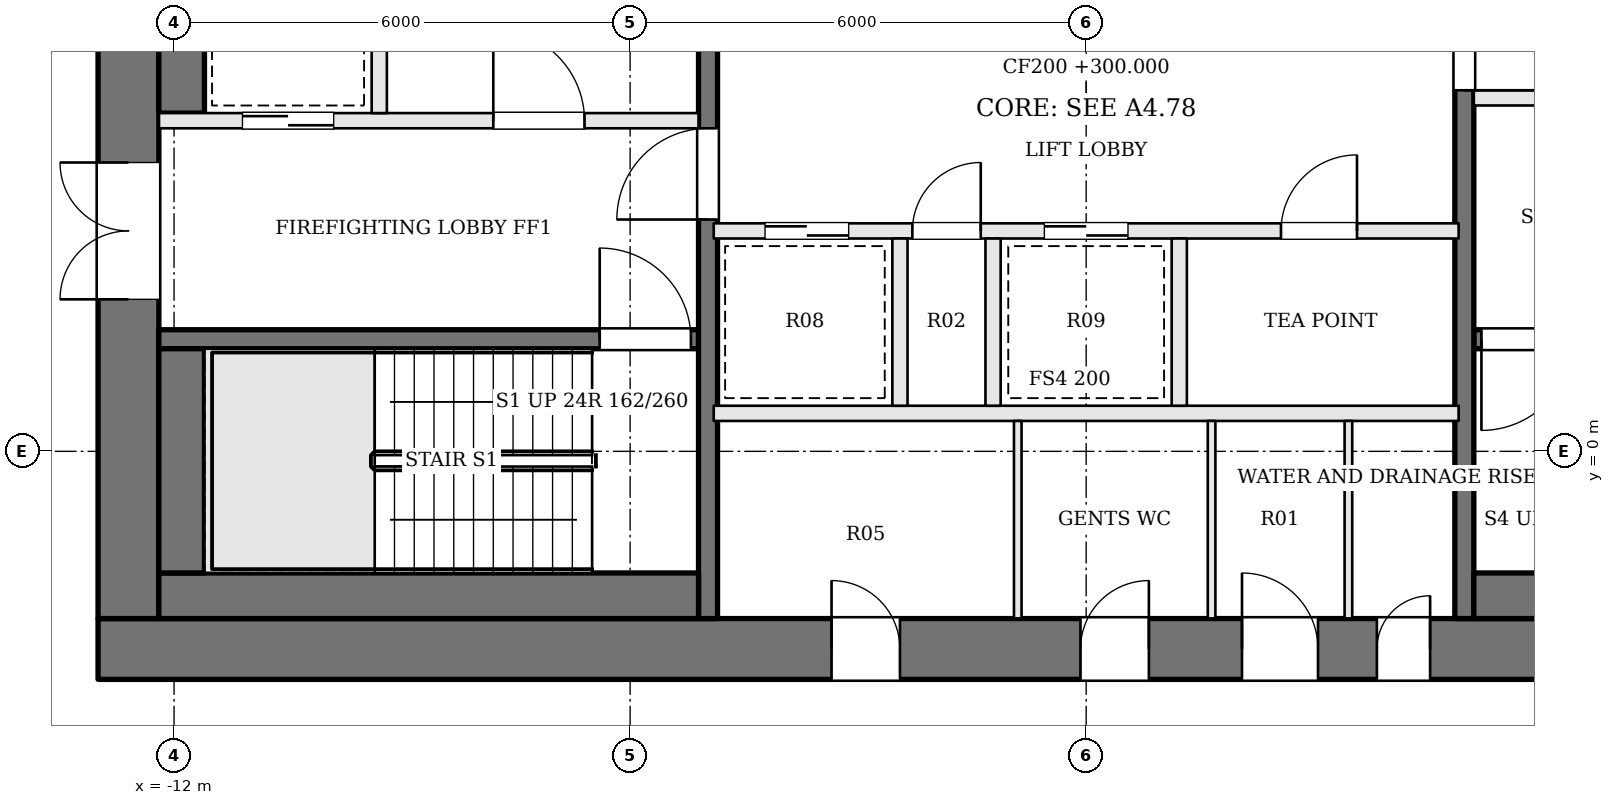
"""IFC4 building model, lengths in metres.
Left out: names, types, materials, properties, quantities, classifications, styles, units other than length and angle.
Written with IfcOpenShell. Run it as: python <this file> out.ifc"""

import sys

from ifc_helpers import new_model, si_unit, direction, frame, frame_2d, origin, place, context, subcontext, project, spatial, rectangle, extrude, element, fill, save


model = new_model("IFC4")
c1 = context("Model", 3, precision=1e-05, world=origin(), true_north=direction((0.0, 1.0)))
c2 = subcontext(c1, "Body", "Model", "MODEL_VIEW")
j1 = project(units=[si_unit("LENGTHUNIT", "METRE"), si_unit("PLANEANGLEUNIT", "RADIAN")], contexts=[c1])
p1 = place(None, origin())
s1 = spatial("IfcSite", under=j1, at=p1, CompositionType="ELEMENT")
p2 = place(p1, origin())
s2 = spatial("IfcBuilding", under=s1, at=p2, CompositionType="ELEMENT")
p3 = place(p2, frame((0.0, 0.0, 300.0)))
s3 = spatial("IfcBuildingStorey", under=s2, at=p3, CompositionType="ELEMENT", Elevation=300.0)
p4 = place(p3, frame((-13.0, -2.6, 0.0), z_axis=(0.0, 0.0, 1.0), x_axis=(1.0, 0.0, 0.0)))
e1 = element("IfcWall", 1, at=p4, inside=s3, PredefinedType="SHEAR", context=c2, shape_type="SweptSolid", body=[
    extrude(rectangle(XDim=26.0, YDim=0.8, at=frame_2d((13.0, 0.0))), origin(), (0.0, 0.0, 1.0), 3.9),
])
p5 = place(p4, frame((9.65, 0.0, 0.0)))
e2 = element("IfcOpeningElement", 2, at=p5, cuts=e1, PredefinedType="OPENING", context=c2, shape_type="SweptSolid", body=[
    extrude(rectangle(XDim=0.9, YDim=2.1, at=frame_2d((0.45, 1.05))), frame((0.0, 0.41, 0.0), z_axis=(0.0, -1.0, 0.0), x_axis=(1.0, 0.0, 0.0)), (0.0, 0.0, 1.0), 0.82),
])
p6 = place(p4, frame((12.925, 0.0, 0.0)))
e3 = element("IfcOpeningElement", 3, at=p6, cuts=e1, PredefinedType="OPENING", context=c2, shape_type="SweptSolid", body=[
    extrude(rectangle(XDim=0.9, YDim=2.1, at=frame_2d((0.45, 1.05))), frame((0.0, 0.41, 0.0), z_axis=(0.0, -1.0, 0.0), x_axis=(1.0, 0.0, 0.0)), (0.0, 0.0, 1.0), 0.82),
])
p7 = place(p4, frame((15.05, 0.0, 0.0)))
e4 = element("IfcOpeningElement", 4, at=p7, cuts=e1, PredefinedType="OPENING", context=c2, shape_type="SweptSolid", body=[
    extrude(rectangle(XDim=1.0, YDim=2.1, at=frame_2d((0.5, 1.05))), frame((0.0, 0.41, 0.0), z_axis=(0.0, -1.0, 0.0), x_axis=(1.0, 0.0, 0.0)), (0.0, 0.0, 1.0), 0.82),
])
p8 = place(p4, frame((16.825, 0.0, 0.0)))
e5 = element("IfcOpeningElement", 5, at=p8, cuts=e1, PredefinedType="OPENING", context=c2, shape_type="SweptSolid", body=[
    extrude(rectangle(XDim=0.7, YDim=2.1, at=frame_2d((0.35, 1.05))), frame((0.0, 0.41, 0.0), z_axis=(0.0, -1.0, 0.0), x_axis=(1.0, 0.0, 0.0)), (0.0, 0.0, 1.0), 0.82),
])
p9 = place(p3, frame((-12.6, -2.2, 0.0), z_axis=(0.0, 0.0, 1.0), x_axis=(0.0, 1.0, 0.0)))
e6 = element("IfcWall", 6, at=p9, inside=s3, PredefinedType="SHEAR", context=c2, shape_type="SweptSolid", body=[
    extrude(rectangle(XDim=13.4, YDim=0.8, at=frame_2d((6.7, 0.0))), origin(), (0.0, 0.0, 1.0), 3.9),
])
p10 = place(p9, frame((4.2, 0.0, 0.0)))
e7 = element("IfcOpeningElement", 7, at=p10, cuts=e6, PredefinedType="OPENING", context=c2, shape_type="SweptSolid", body=[
    extrude(rectangle(XDim=1.8, YDim=2.1, at=frame_2d((0.9, 1.05))), frame((0.0, 0.41, 0.0), z_axis=(0.0, -1.0, 0.0), x_axis=(1.0, 0.0, 0.0)), (0.0, 0.0, 1.0), 0.82),
])
p11 = place(p3, frame((-12.2, 1.475, 0.0), z_axis=(0.0, 0.0, 1.0), x_axis=(1.0, 0.0, 0.0)))
e8 = element("IfcWall", 8, at=p11, inside=s3, PredefinedType="SOLIDWALL", context=c2, shape_type="SweptSolid", body=[
    extrude(rectangle(XDim=7.1, YDim=0.25, at=frame_2d((3.55, 0.0))), origin(), (0.0, 0.0, 1.0), 3.7),
])
p12 = place(p11, frame((5.8, 0.0, 0.0)))
e9 = element("IfcOpeningElement", 9, at=p12, cuts=e8, PredefinedType="OPENING", context=c2, shape_type="SweptSolid", body=[
    extrude(rectangle(XDim=1.2, YDim=2.1, at=frame_2d((0.6, 1.05))), frame((0.0, 0.135, 0.0), z_axis=(0.0, -1.0, 0.0), x_axis=(1.0, 0.0, 0.0)), (0.0, 0.0, 1.0), 0.27),
])
p13 = place(p3, frame((-12.2, 4.35, 0.0), z_axis=(0.0, 0.0, 1.0), x_axis=(1.0, 0.0, 0.0)))
e10 = element("IfcWall", 10, at=p13, inside=s3, PredefinedType="SOLIDWALL", context=c2, shape_type="SweptSolid", body=[
    extrude(rectangle(XDim=7.1, YDim=0.2, at=frame_2d((3.55, 0.0))), origin(), (0.0, 0.0, 1.0), 3.7),
])
p14 = place(p13, frame((4.4, 0.0, 0.0)))
e11 = element("IfcOpeningElement", 11, at=p14, cuts=e10, PredefinedType="OPENING", context=c2, shape_type="SweptSolid", body=[
    extrude(rectangle(XDim=1.2, YDim=2.1, at=frame_2d((0.6, 1.05))), frame((0.0, 0.11, 0.0), z_axis=(0.0, -1.0, 0.0), x_axis=(1.0, 0.0, 0.0)), (0.0, 0.0, 1.0), 0.22),
])
p15 = place(p13, frame((1.1, 0.0, 0.0)))
e12 = element("IfcOpeningElement", 12, at=p15, cuts=e10, PredefinedType="OPENING", context=c2, shape_type="SweptSolid", body=[
    extrude(rectangle(XDim=1.2, YDim=2.1, at=frame_2d((0.6, 1.05))), frame((0.0, 0.11, 0.0), z_axis=(0.0, -1.0, 0.0), x_axis=(1.0, 0.0, 0.0)), (0.0, 0.0, 1.0), 0.22),
])
p16 = place(p3, frame((12.2, 4.65, 0.0), z_axis=(0.0, 0.0, 1.0), x_axis=(-1.0, 0.0, 0.0)))
e13 = element("IfcWall", 13, at=p16, inside=s3, PredefinedType="SOLIDWALL", context=c2, shape_type="SweptSolid", body=[
    extrude(rectangle(XDim=7.1, YDim=0.2, at=frame_2d((3.55, 0.0))), origin(), (0.0, 0.0, 1.0), 3.7),
])
p17 = place(p16, frame((4.4, 0.0, 0.0)))
e14 = element("IfcOpeningElement", 14, at=p17, cuts=e13, PredefinedType="OPENING", context=c2, shape_type="SweptSolid", body=[
    extrude(rectangle(XDim=1.2, YDim=2.1, at=frame_2d((0.6, 1.05))), frame((0.0, 0.11, 0.0), z_axis=(0.0, -1.0, 0.0), x_axis=(1.0, 0.0, 0.0)), (0.0, 0.0, 1.0), 0.22),
])
p18 = place(p16, frame((1.1, 0.0, 0.0)))
e15 = element("IfcOpeningElement", 15, at=p18, cuts=e13, PredefinedType="OPENING", context=c2, shape_type="SweptSolid", body=[
    extrude(rectangle(XDim=1.2, YDim=2.1, at=frame_2d((0.6, 1.05))), frame((0.0, 0.11, 0.0), z_axis=(0.0, -1.0, 0.0), x_axis=(1.0, 0.0, 0.0)), (0.0, 0.0, 1.0), 0.22),
])
p19 = place(p3, frame((12.2, 1.475, 0.0), z_axis=(0.0, 0.0, 1.0), x_axis=(-1.0, 0.0, 0.0)))
e16 = element("IfcWall", 16, at=p19, inside=s3, PredefinedType="SOLIDWALL", context=c2, shape_type="SweptSolid", body=[
    extrude(rectangle(XDim=7.1, YDim=0.25, at=frame_2d((3.55, 0.0))), origin(), (0.0, 0.0, 1.0), 3.7),
])
p20 = place(p19, frame((5.8, 0.0, 0.0)))
e17 = element("IfcOpeningElement", 17, at=p20, cuts=e16, PredefinedType="OPENING", context=c2, shape_type="SweptSolid", body=[
    extrude(rectangle(XDim=1.2, YDim=2.1, at=frame_2d((0.6, 1.05))), frame((0.0, 0.135, 0.0), z_axis=(0.0, -1.0, 0.0), x_axis=(1.0, 0.0, 0.0)), (0.0, 0.0, 1.0), 0.27),
])
p21 = place(p3, frame((-9.3, 4.45, 0.0), z_axis=(0.0, 0.0, 1.0), x_axis=(0.0, 1.0, 0.0)))
e18 = element("IfcWall", 18, at=p21, inside=s3, PredefinedType="SOLIDWALL", context=c2, shape_type="SweptSolid", body=[
    extrude(rectangle(XDim=3.0, YDim=0.2, at=frame_2d((1.5, 0.0))), origin(), (0.0, 0.0, 1.0), 3.7),
])
p22 = place(p3, frame((-4.975, -2.2, 0.0), z_axis=(0.0, 0.0, 1.0), x_axis=(0.0, 1.0, 0.0)))
e19 = element("IfcWall", 19, at=p22, inside=s3, PredefinedType="SOLIDWALL", context=c2, shape_type="SweptSolid", body=[
    extrude(rectangle(XDim=13.4, YDim=0.25, at=frame_2d((6.7, 0.0))), origin(), (0.0, 0.0, 1.0), 3.7),
])
p23 = place(p22, frame((5.25, 0.0, 0.0)))
e20 = element("IfcOpeningElement", 20, at=p23, cuts=e19, PredefinedType="OPENING", context=c2, shape_type="SweptSolid", body=[
    extrude(rectangle(XDim=1.2, YDim=2.1, at=frame_2d((0.6, 1.05))), frame((0.0, 0.135, 0.0), z_axis=(0.0, -1.0, 0.0), x_axis=(1.0, 0.0, 0.0)), (0.0, 0.0, 1.0), 0.27),
])
p24 = place(p3, frame((4.975, 11.2, 0.0), z_axis=(0.0, 0.0, 1.0), x_axis=(0.0, -1.0, 0.0)))
e21 = element("IfcWall", 21, at=p24, inside=s3, PredefinedType="SOLIDWALL", context=c2, shape_type="SweptSolid", body=[
    extrude(rectangle(XDim=13.4, YDim=0.25, at=frame_2d((6.7, 0.0))), origin(), (0.0, 0.0, 1.0), 3.7),
])
p25 = place(p24, frame((5.25, 0.0, 0.0)))
e22 = element("IfcOpeningElement", 22, at=p25, cuts=e21, PredefinedType="OPENING", context=c2, shape_type="SweptSolid", body=[
    extrude(rectangle(XDim=1.2, YDim=2.1, at=frame_2d((0.6, 1.05))), frame((0.0, 0.135, 0.0), z_axis=(0.0, -1.0, 0.0), x_axis=(1.0, 0.0, 0.0)), (0.0, 0.0, 1.0), 0.27),
])
p26 = place(p3, frame((-12.2, -1.9, 0.0), z_axis=(0.0, 0.0, 1.0), x_axis=(1.0, 0.0, 0.0)))
e23 = element("IfcWall", 23, at=p26, inside=s3, PredefinedType="SOLIDWALL", context=c2, shape_type="SweptSolid", body=[
    extrude(rectangle(XDim=7.1, YDim=0.6, at=frame_2d((3.55, 0.0))), origin(), (0.0, 0.0, 1.0), 3.7),
])
p27 = place(p3, frame((-11.9, -1.6, 0.0), z_axis=(0.0, 0.0, 1.0), x_axis=(0.0, 1.0, 0.0)))
e24 = element("IfcWall", 24, at=p27, inside=s3, PredefinedType="SOLIDWALL", context=c2, shape_type="SweptSolid", body=[
    extrude(rectangle(XDim=2.95, YDim=0.6, at=frame_2d((1.475, 0.0))), origin(), (0.0, 0.0, 1.0), 3.7),
])
p28 = place(p3, frame((-11.9, 4.45, 0.0), z_axis=(0.0, 0.0, 1.0), x_axis=(0.0, 1.0, 0.0)))
e25 = element("IfcWall", 25, at=p28, inside=s3, PredefinedType="SOLIDWALL", context=c2, shape_type="SweptSolid", body=[
    extrude(rectangle(XDim=3.0, YDim=0.6, at=frame_2d((1.5, 0.0))), origin(), (0.0, 0.0, 1.0), 3.7),
])
p29 = place(p3, frame((12.2, -1.9, 0.0), z_axis=(0.0, 0.0, 1.0), x_axis=(-1.0, 0.0, 0.0)))
e26 = element("IfcWall", 26, at=p29, inside=s3, PredefinedType="SOLIDWALL", context=c2, shape_type="SweptSolid", body=[
    extrude(rectangle(XDim=7.1, YDim=0.6, at=frame_2d((3.55, 0.0))), origin(), (0.0, 0.0, 1.0), 3.7),
])
p30 = place(p3, frame((-4.9, 0.5, 0.0), z_axis=(0.0, 0.0, 1.0), x_axis=(1.0, 0.0, 0.0)))
e27 = element("IfcWall", 27, at=p30, inside=s3, PredefinedType="SOLIDWALL", context=c2, shape_type="SweptSolid", body=[
    extrude(rectangle(XDim=9.8, YDim=0.2, at=frame_2d((4.9, 0.0))), origin(), (0.0, 0.0, 1.0), 3.7),
])
p31 = place(p3, frame((-4.9, 2.9, 0.0), z_axis=(0.0, 0.0, 1.0), x_axis=(1.0, 0.0, 0.0)))
e28 = element("IfcWall", 28, at=p31, inside=s3, PredefinedType="SOLIDWALL", context=c2, shape_type="SweptSolid", body=[
    extrude(rectangle(XDim=9.8, YDim=0.2, at=frame_2d((4.9, 0.0))), origin(), (0.0, 0.0, 1.0), 3.7),
])
p32 = place(p31, frame((0.675, 0.0, 0.0)))
e29 = element("IfcOpeningElement", 29, at=p32, cuts=e28, PredefinedType="OPENING", context=c2, shape_type="SweptSolid", body=[
    extrude(rectangle(XDim=1.1, YDim=2.1, at=frame_2d((0.55, 1.05))), frame((0.0, 0.11, 0.0), z_axis=(0.0, -1.0, 0.0), x_axis=(1.0, 0.0, 0.0)), (0.0, 0.0, 1.0), 0.22),
])
p33 = place(p31, frame((2.613, 0.0, 0.0)))
e30 = element("IfcOpeningElement", 30, at=p33, cuts=e28, PredefinedType="OPENING", context=c2, shape_type="SweptSolid", body=[
    extrude(rectangle(XDim=0.9, YDim=2.1, at=frame_2d((0.45, 1.05))), frame((0.0, 0.11, 0.0), z_axis=(0.0, -1.0, 0.0), x_axis=(1.0, 0.0, 0.0)), (0.0, 0.0, 1.0), 0.22),
])
p34 = place(p31, frame((4.35, 0.0, 0.0)))
e31 = element("IfcOpeningElement", 31, at=p34, cuts=e28, PredefinedType="OPENING", context=c2, shape_type="SweptSolid", body=[
    extrude(rectangle(XDim=1.1, YDim=2.1, at=frame_2d((0.55, 1.05))), frame((0.0, 0.11, 0.0), z_axis=(0.0, -1.0, 0.0), x_axis=(1.0, 0.0, 0.0)), (0.0, 0.0, 1.0), 0.22),
])
p35 = place(p31, frame((7.463, 0.0, 0.0)))
e32 = element("IfcOpeningElement", 32, at=p35, cuts=e28, PredefinedType="OPENING", context=c2, shape_type="SweptSolid", body=[
    extrude(rectangle(XDim=1.0, YDim=2.1, at=frame_2d((0.5, 1.05))), frame((0.0, 0.11, 0.0), z_axis=(0.0, -1.0, 0.0), x_axis=(1.0, 0.0, 0.0)), (0.0, 0.0, 1.0), 0.22),
])
for number, where, z_axis, x_axis in (
    (33, (-2.45, 0.6, 0.0), (0.0, 0.0, 1.0), (0.0, 1.0, 0.0)),
    (34, (-1.225, 0.6, 0.0), (0.0, 0.0, 1.0), (0.0, 1.0, 0.0)),
    (35, (1.225, 0.6, 0.0), (0.0, 0.0, 1.0), (0.0, 1.0, 0.0)),
):
    element("IfcWall", number, at=place(p3, frame(where, z_axis=z_axis, x_axis=x_axis)), inside=s3, PredefinedType="SOLIDWALL", context=c2, shape_type="SweptSolid", body=[
        extrude(rectangle(XDim=2.2, YDim=0.2, at=frame_2d((1.1, 0.0))), origin(), (0.0, 0.0, 1.0), 3.7),
    ])
for number, where, z_axis, x_axis in (
    (36, (-0.9, -2.2, 0.0), (0.0, 0.0, 1.0), (0.0, 1.0, 0.0)),
    (37, (1.65, -2.2, 0.0), (0.0, 0.0, 1.0), (0.0, 1.0, 0.0)),
    (38, (3.45, -2.2, 0.0), (0.0, 0.0, 1.0), (0.0, 1.0, 0.0)),
):
    element("IfcWall", number, at=place(p3, frame(where, z_axis=z_axis, x_axis=x_axis)), inside=s3, PredefinedType="PARTITIONING", context=c2, shape_type="SweptSolid", body=[
        extrude(rectangle(XDim=2.6, YDim=0.1, at=frame_2d((1.3, 0.0))), origin(), (0.0, 0.0, 1.0), 3.7),
    ])
p36 = place(p10, origin())
e39 = element("IfcDoor", 39, at=p36, inside=s3, OperationType="DOUBLE_DOOR_SINGLE_SWING", PredefinedType="DOOR", context=c2, shape_type="SweptSolid", body=[
    extrude(rectangle(XDim=1.8, YDim=2.1, at=frame_2d((0.9, 1.05))), frame((0.0, 0.025, 0.0), z_axis=(0.0, -1.0, 0.0), x_axis=(1.0, 0.0, 0.0)), (0.0, 0.0, 1.0), 0.05),
])
fill(e7, e39)
p37 = place(p23, origin())
e40 = element("IfcDoor", 40, at=p37, inside=s3, OperationType="SINGLE_SWING_LEFT", PredefinedType="DOOR", context=c2, shape_type="SweptSolid", body=[
    extrude(rectangle(XDim=1.2, YDim=2.1, at=frame_2d((0.6, 1.05))), frame((0.0, 0.025, 0.0), z_axis=(0.0, -1.0, 0.0), x_axis=(1.0, 0.0, 0.0)), (0.0, 0.0, 1.0), 0.05),
])
fill(e20, e40)
p38 = place(p25, origin())
e41 = element("IfcDoor", 41, at=p38, inside=s3, OperationType="SINGLE_SWING_RIGHT", PredefinedType="DOOR", context=c2, shape_type="SweptSolid", body=[
    extrude(rectangle(XDim=1.2, YDim=2.1, at=frame_2d((0.6, 1.05))), frame((0.0, 0.025, 0.0), z_axis=(0.0, -1.0, 0.0), x_axis=(1.0, 0.0, 0.0)), (0.0, 0.0, 1.0), 0.05),
])
fill(e22, e41)
p39 = place(p14, origin())
e42 = element("IfcDoor", 42, at=p39, inside=s3, OperationType="SINGLE_SWING_LEFT", PredefinedType="DOOR", context=c2, shape_type="SweptSolid", body=[
    extrude(rectangle(XDim=1.2, YDim=2.1, at=frame_2d((0.6, 1.05))), frame((0.0, 0.025, 0.0), z_axis=(0.0, -1.0, 0.0), x_axis=(1.0, 0.0, 0.0)), (0.0, 0.0, 1.0), 0.05),
])
fill(e11, e42)
p40 = place(p12, origin())
e43 = element("IfcDoor", 43, at=p40, inside=s3, OperationType="SINGLE_SWING_LEFT", PredefinedType="DOOR", context=c2, shape_type="SweptSolid", body=[
    extrude(rectangle(XDim=1.2, YDim=2.1, at=frame_2d((0.6, 1.05))), frame((0.0, 0.025, 0.0), z_axis=(0.0, -1.0, 0.0), x_axis=(1.0, 0.0, 0.0)), (0.0, 0.0, 1.0), 0.05),
])
fill(e9, e43)
p41 = place(p20, origin())
e44 = element("IfcDoor", 44, at=p41, inside=s3, OperationType="SINGLE_SWING_RIGHT", PredefinedType="DOOR", context=c2, shape_type="SweptSolid", body=[
    extrude(rectangle(XDim=1.2, YDim=2.1, at=frame_2d((0.6, 1.05))), frame((0.0, 0.025, 0.0), z_axis=(0.0, -1.0, 0.0), x_axis=(1.0, 0.0, 0.0)), (0.0, 0.0, 1.0), 0.05),
])
fill(e17, e44)
p42 = place(p15, origin())
e45 = element("IfcDoor", 45, at=p42, inside=s3, OperationType="SLIDING_TO_RIGHT", PredefinedType="DOOR", context=c2, shape_type="SweptSolid", body=[
    extrude(rectangle(XDim=1.2, YDim=2.1, at=frame_2d((0.6, 1.05))), frame((0.0, 0.025, 0.0), z_axis=(0.0, -1.0, 0.0), x_axis=(1.0, 0.0, 0.0)), (0.0, 0.0, 1.0), 0.05),
])
fill(e12, e45)
p43 = place(p32, origin())
e46 = element("IfcDoor", 46, at=p43, inside=s3, OperationType="SLIDING_TO_RIGHT", PredefinedType="DOOR", context=c2, shape_type="SweptSolid", body=[
    extrude(rectangle(XDim=1.1, YDim=2.1, at=frame_2d((0.55, 1.05))), frame((0.0, 0.025, 0.0), z_axis=(0.0, -1.0, 0.0), x_axis=(1.0, 0.0, 0.0)), (0.0, 0.0, 1.0), 0.05),
])
fill(e29, e46)
p44 = place(p33, origin())
e47 = element("IfcDoor", 47, at=p44, inside=s3, OperationType="SINGLE_SWING_RIGHT", PredefinedType="DOOR", context=c2, shape_type="SweptSolid", body=[
    extrude(rectangle(XDim=0.9, YDim=2.1, at=frame_2d((0.45, 1.05))), frame((0.0, 0.025, 0.0), z_axis=(0.0, -1.0, 0.0), x_axis=(1.0, 0.0, 0.0)), (0.0, 0.0, 1.0), 0.05),
])
fill(e30, e47)
p45 = place(p34, origin())
e48 = element("IfcDoor", 48, at=p45, inside=s3, OperationType="SLIDING_TO_LEFT", PredefinedType="DOOR", context=c2, shape_type="SweptSolid", body=[
    extrude(rectangle(XDim=1.1, YDim=2.1, at=frame_2d((0.55, 1.05))), frame((0.0, 0.025, 0.0), z_axis=(0.0, -1.0, 0.0), x_axis=(1.0, 0.0, 0.0)), (0.0, 0.0, 1.0), 0.05),
])
fill(e31, e48)
p46 = place(p35, origin())
e49 = element("IfcDoor", 49, at=p46, inside=s3, OperationType="SINGLE_SWING_RIGHT", PredefinedType="DOOR", context=c2, shape_type="SweptSolid", body=[
    extrude(rectangle(XDim=1.0, YDim=2.1, at=frame_2d((0.5, 1.05))), frame((0.0, 0.025, 0.0), z_axis=(0.0, -1.0, 0.0), x_axis=(1.0, 0.0, 0.0)), (0.0, 0.0, 1.0), 0.05),
])
fill(e32, e49)
p47 = place(p5, origin())
e50 = element("IfcDoor", 50, at=p47, inside=s3, OperationType="SINGLE_SWING_LEFT", PredefinedType="DOOR", context=c2, shape_type="SweptSolid", body=[
    extrude(rectangle(XDim=0.9, YDim=2.1, at=frame_2d((0.45, 1.05))), frame((0.0, 0.025, 0.0), z_axis=(0.0, -1.0, 0.0), x_axis=(1.0, 0.0, 0.0)), (0.0, 0.0, 1.0), 0.05),
])
fill(e2, e50)
p48 = place(p6, origin())
e51 = element("IfcDoor", 51, at=p48, inside=s3, OperationType="SINGLE_SWING_RIGHT", PredefinedType="DOOR", context=c2, shape_type="SweptSolid", body=[
    extrude(rectangle(XDim=0.9, YDim=2.1, at=frame_2d((0.45, 1.05))), frame((0.0, 0.025, 0.0), z_axis=(0.0, -1.0, 0.0), x_axis=(1.0, 0.0, 0.0)), (0.0, 0.0, 1.0), 0.05),
])
fill(e3, e51)
p49 = place(p7, origin())
e52 = element("IfcDoor", 52, at=p49, inside=s3, OperationType="SINGLE_SWING_LEFT", PredefinedType="DOOR", context=c2, shape_type="SweptSolid", body=[
    extrude(rectangle(XDim=1.0, YDim=2.1, at=frame_2d((0.5, 1.05))), frame((0.0, 0.025, 0.0), z_axis=(0.0, -1.0, 0.0), x_axis=(1.0, 0.0, 0.0)), (0.0, 0.0, 1.0), 0.05),
])
fill(e4, e52)
p50 = place(p8, origin())
e53 = element("IfcDoor", 53, at=p50, inside=s3, OperationType="SINGLE_SWING_RIGHT", PredefinedType="DOOR", context=c2, shape_type="SweptSolid", body=[
    extrude(rectangle(XDim=0.7, YDim=2.1, at=frame_2d((0.35, 1.05))), frame((0.0, 0.025, 0.0), z_axis=(0.0, -1.0, 0.0), x_axis=(1.0, 0.0, 0.0)), (0.0, 0.0, 1.0), 0.05),
])
fill(e5, e53)
save(model, sys.argv[1])
